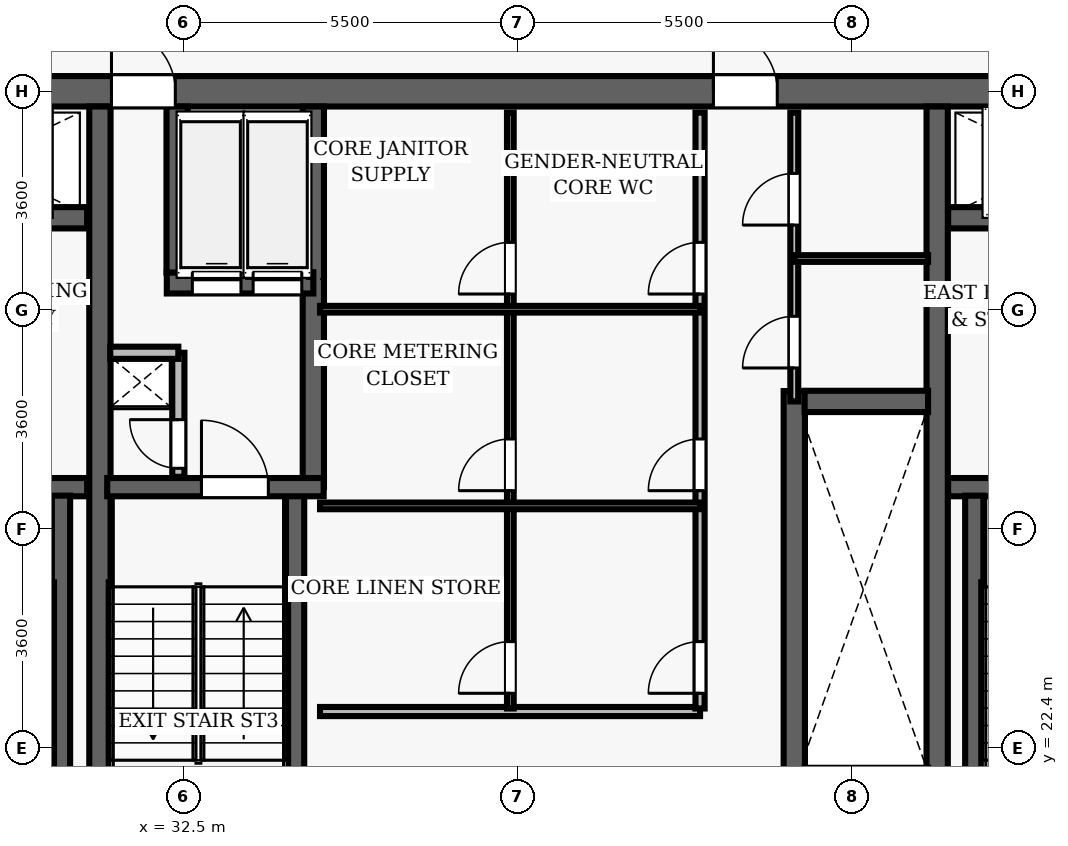
"""IFC4 building model, lengths in metres.
Left out: names, types, materials, properties, quantities, classifications, styles, units other than length and angle.
Written with IfcOpenShell. Run it as: python <this file> out.ifc"""

import sys

from ifc_helpers import new_model, si_unit, direction, frame, frame_2d, origin, place, context, subcontext, project, spatial, rectangle, extrude, element, fill, save


model = new_model("IFC4")
c1 = context("Model", 3, precision=1e-05, world=origin(), true_north=direction((0.0, 1.0)))
c2 = subcontext(c1, "Body", "Model", "MODEL_VIEW")
j1 = project(units=[si_unit("LENGTHUNIT", "METRE"), si_unit("PLANEANGLEUNIT", "RADIAN")], contexts=[c1])
p1 = place(None, origin())
s1 = spatial("IfcSite", under=j1, at=p1, CompositionType="ELEMENT")
p2 = place(p1, origin())
s2 = spatial("IfcBuilding", under=s1, at=p2, CompositionType="ELEMENT")
p3 = place(p2, frame((0.0, 0.0, 198.15)))
s3 = spatial("IfcBuildingStorey", under=s2, at=p3, CompositionType="ELEMENT", Elevation=198.15)
p4 = place(p3, frame((26.75, 33.2, 0.0), z_axis=(0.0, 0.0, 1.0), x_axis=(1.0, 0.0, 0.0)))
e1 = element("IfcWall", 1, at=p4, inside=s3, PredefinedType="SHEAR", context=c2, shape_type="SweptSolid", body=[
    extrude(rectangle(XDim=22.5, YDim=0.5, at=frame_2d((11.25, 0.0))), origin(), (0.0, 0.0, 1.0), 3.85),
])
p5 = place(p4, frame((4.57, 0.0, 0.0)))
e2 = element("IfcOpeningElement", 2, at=p5, cuts=e1, PredefinedType="OPENING", context=c2, shape_type="SweptSolid", body=[
    extrude(rectangle(XDim=1.05, YDim=2.15, at=frame_2d((0.525, 1.075))), frame((0.0, 0.26, 0.0), z_axis=(0.0, -1.0, 0.0), x_axis=(1.0, 0.0, 0.0)), (0.0, 0.0, 1.0), 0.52),
])
p6 = place(p4, frame((14.47, 0.0, 0.0)))
e3 = element("IfcOpeningElement", 3, at=p6, cuts=e1, PredefinedType="OPENING", context=c2, shape_type="SweptSolid", body=[
    extrude(rectangle(XDim=1.05, YDim=2.15, at=frame_2d((0.525, 1.075))), frame((0.0, 0.26, 0.0), z_axis=(0.0, -1.0, 0.0), x_axis=(1.0, 0.0, 0.0)), (0.0, 0.0, 1.0), 0.52),
])
for number, where, z_axis, x_axis in (
    (4, (31.13, 19.05, 0.0), (0.0, 0.0, 1.0), (0.0, 1.0, 0.0)),
    (5, (44.9, 19.05, 0.0), (0.0, 0.0, 1.0), (0.0, 1.0, 0.0)),
):
    element("IfcWall", number, at=place(p3, frame(where, z_axis=z_axis, x_axis=x_axis)), inside=s3, PredefinedType="SHEAR", context=c2, shape_type="SweptSolid", body=[
        extrude(rectangle(XDim=13.9, YDim=0.35, at=frame_2d((6.95, 0.0))), origin(), (0.0, 0.0, 1.0), 3.85),
    ])
p7 = place(p3, frame((27.25, 26.69, 0.0), z_axis=(0.0, 0.0, 1.0), x_axis=(1.0, 0.0, 0.0)))
e6 = element("IfcWall", 6, at=p7, inside=s3, PredefinedType="SHEAR", context=c2, shape_type="SweptSolid", body=[
    extrude(rectangle(XDim=3.67, YDim=0.3, at=frame_2d((1.835, 0.0))), origin(), (0.0, 0.0, 1.0), 3.85),
])
p8 = place(p7, frame((1.05, 0.0, 0.0)))
e7 = element("IfcOpeningElement", 7, at=p8, cuts=e6, PredefinedType="OPENING", context=c2, shape_type="SweptSolid", body=[
    extrude(rectangle(XDim=1.1, YDim=2.15, at=frame_2d((0.55, 1.075))), frame((0.0, 0.16, 0.0), z_axis=(0.0, -1.0, 0.0), x_axis=(1.0, 0.0, 0.0)), (0.0, 0.0, 1.0), 0.32),
])
p9 = place(p3, frame((30.49, 19.05, 0.0), z_axis=(0.0, 0.0, 1.0), x_axis=(0.0, 1.0, 0.0)))
e8 = element("IfcWall", 8, at=p9, inside=s3, PredefinedType="SHEAR", context=c2, shape_type="SweptSolid", body=[
    extrude(rectangle(XDim=7.5, YDim=0.3, at=frame_2d((3.75, 0.0))), origin(), (0.0, 0.0, 1.0), 3.85),
])
p10 = place(p3, frame((27.25, 31.12, 0.0), z_axis=(0.0, 0.0, 1.0), x_axis=(1.0, 0.0, 0.0)))
e9 = element("IfcWall", 9, at=p10, inside=s3, PredefinedType="SHEAR", context=c2, shape_type="SweptSolid", body=[
    extrude(rectangle(XDim=3.67, YDim=0.35, at=frame_2d((1.835, 0.0))), origin(), (0.0, 0.0, 1.0), 3.035),
])
p11 = place(p10, frame((1.25, 0.0, 0.0)))
e10 = element("IfcOpeningElement", 10, at=p11, cuts=e9, PredefinedType="OPENING", context=c2, shape_type="SweptSolid", body=[
    extrude(rectangle(XDim=1.1, YDim=2.15, at=frame_2d((0.55, 1.075))), frame((0.0, 0.185, 0.0), z_axis=(0.0, -1.0, 0.0), x_axis=(1.0, 0.0, 0.0)), (0.0, 0.0, 1.0), 0.37),
])
p12 = place(p3, frame((45.08, 26.69, 0.0), z_axis=(0.0, 0.0, 1.0), x_axis=(1.0, 0.0, 0.0)))
e11 = element("IfcWall", 11, at=p12, inside=s3, PredefinedType="SHEAR", context=c2, shape_type="SweptSolid", body=[
    extrude(rectangle(XDim=3.67, YDim=0.3, at=frame_2d((1.835, 0.0))), origin(), (0.0, 0.0, 1.0), 3.85),
])
p13 = place(p12, frame((1.05, 0.0, 0.0)))
e12 = element("IfcOpeningElement", 12, at=p13, cuts=e11, PredefinedType="OPENING", context=c2, shape_type="SweptSolid", body=[
    extrude(rectangle(XDim=1.1, YDim=2.15, at=frame_2d((0.55, 1.075))), frame((0.0, 0.16, 0.0), z_axis=(0.0, -1.0, 0.0), x_axis=(1.0, 0.0, 0.0)), (0.0, 0.0, 1.0), 0.32),
])
p14 = place(p3, frame((45.51, 19.05, 0.0), z_axis=(0.0, 0.0, 1.0), x_axis=(0.0, 1.0, 0.0)))
e13 = element("IfcWall", 13, at=p14, inside=s3, PredefinedType="SHEAR", context=c2, shape_type="SweptSolid", body=[
    extrude(rectangle(XDim=7.5, YDim=0.3, at=frame_2d((3.75, 0.0))), origin(), (0.0, 0.0, 1.0), 3.85),
])
p15 = place(p3, frame((45.08, 31.12, 0.0), z_axis=(0.0, 0.0, 1.0), x_axis=(1.0, 0.0, 0.0)))
e14 = element("IfcWall", 14, at=p15, inside=s3, PredefinedType="SHEAR", context=c2, shape_type="SweptSolid", body=[
    extrude(rectangle(XDim=3.67, YDim=0.35, at=frame_2d((1.835, 0.0))), origin(), (0.0, 0.0, 1.0), 3.035),
])
p16 = place(p15, frame((1.25, 0.0, 0.0)))
e15 = element("IfcOpeningElement", 15, at=p16, cuts=e14, PredefinedType="OPENING", context=c2, shape_type="SweptSolid", body=[
    extrude(rectangle(XDim=1.1, YDim=2.15, at=frame_2d((0.55, 1.075))), frame((0.0, 0.185, 0.0), z_axis=(0.0, -1.0, 0.0), x_axis=(1.0, 0.0, 0.0)), (0.0, 0.0, 1.0), 0.37),
])
p17 = place(p3, frame((34.34, 19.05, 0.0), z_axis=(0.0, 0.0, 1.0), x_axis=(0.0, 1.0, 0.0)))
e16 = element("IfcWall", 16, at=p17, inside=s3, PredefinedType="SHEAR", context=c2, shape_type="SweptSolid", body=[
    extrude(rectangle(XDim=7.5, YDim=0.3, at=frame_2d((3.75, 0.0))), origin(), (0.0, 0.0, 1.0), 3.85),
])
p18 = place(p3, frame((34.64, 26.69, 0.0), z_axis=(0.0, 0.0, 1.0), x_axis=(0.0, 1.0, 0.0)))
e17 = element("IfcWall", 17, at=p18, inside=s3, PredefinedType="SHEAR", context=c2, shape_type="SweptSolid", body=[
    extrude(rectangle(XDim=6.26, YDim=0.35, at=frame_2d((3.13, 0.0))), origin(), (0.0, 0.0, 1.0), 3.85),
])
p19 = place(p3, frame((31.25, 26.69, 0.0), z_axis=(0.0, 0.0, 1.0), x_axis=(1.0, 0.0, 0.0)))
e18 = element("IfcWall", 18, at=p19, inside=s3, PredefinedType="SHEAR", context=c2, shape_type="SweptSolid", body=[
    extrude(rectangle(XDim=3.56, YDim=0.3, at=frame_2d((1.78, 0.0))), origin(), (0.0, 0.0, 1.0), 3.85),
])
p20 = place(p19, frame((1.55, 0.0, 0.0)))
e19 = element("IfcOpeningElement", 19, at=p20, cuts=e18, PredefinedType="OPENING", context=c2, shape_type="SweptSolid", body=[
    extrude(rectangle(XDim=1.1, YDim=2.15, at=frame_2d((0.55, 1.075))), frame((0.0, 0.16, 0.0), z_axis=(0.0, -1.0, 0.0), x_axis=(1.0, 0.0, 0.0)), (0.0, 0.0, 1.0), 0.32),
])
p21 = place(p3, frame((32.23, 30.05, 0.0), z_axis=(0.0, 0.0, 1.0), x_axis=(1.0, 0.0, 0.0)))
e20 = element("IfcWall", 20, at=p21, inside=s3, PredefinedType="SHEAR", context=c2, shape_type="SweptSolid", body=[
    extrude(rectangle(XDim=2.41, YDim=0.35, at=frame_2d((1.205, 0.0))), origin(), (0.0, 0.0, 1.0), 3.035),
])
p22 = place(p21, frame((0.42, 0.0, 0.0)))
e21 = element("IfcOpeningElement", 21, at=p22, cuts=e20, PredefinedType="OPENING", context=c2, shape_type="SweptSolid", body=[
    extrude(rectangle(XDim=0.8, YDim=2.15, at=frame_2d((0.4, 1.075))), frame((0.0, 0.185, 0.0), z_axis=(0.0, -1.0, 0.0), x_axis=(1.0, 0.0, 0.0)), (0.0, 0.0, 1.0), 0.37),
])
p23 = place(p21, frame((1.42, 0.0, 0.0)))
e22 = element("IfcOpeningElement", 22, at=p23, cuts=e20, PredefinedType="OPENING", context=c2, shape_type="SweptSolid", body=[
    extrude(rectangle(XDim=0.8, YDim=2.15, at=frame_2d((0.4, 1.075))), frame((0.0, 0.185, 0.0), z_axis=(0.0, -1.0, 0.0), x_axis=(1.0, 0.0, 0.0)), (0.0, 0.0, 1.0), 0.37),
])
p24 = place(p3, frame((32.4, 30.22, 0.0), z_axis=(0.0, 0.0, 1.0), x_axis=(0.0, 1.0, 0.0)))
e23 = element("IfcWall", 23, at=p24, inside=s3, PredefinedType="SHEAR", context=c2, shape_type="SweptSolid", body=[
    extrude(rectangle(XDim=2.73, YDim=0.35, at=frame_2d((1.365, 0.0))), origin(), (0.0, 0.0, 1.0), 3.035),
])
p25 = place(p3, frame((32.42, 26.86, 0.0), z_axis=(0.0, 0.0, 1.0), x_axis=(0.0, 1.0, 0.0)))
e24 = element("IfcWall", 24, at=p25, inside=s3, PredefinedType="PARTITIONING", context=c2, shape_type="SweptSolid", body=[
    extrude(rectangle(XDim=2.04, YDim=0.2, at=frame_2d((1.02, 0.0))), origin(), (0.0, 0.0, 1.0), 3.035),
])
p26 = place(p25, frame((0.14, 0.0, 0.0)))
e25 = element("IfcOpeningElement", 25, at=p26, cuts=e24, PredefinedType="OPENING", context=c2, shape_type="SweptSolid", body=[
    extrude(rectangle(XDim=0.8, YDim=2.05, at=frame_2d((0.4, 1.025))), frame((0.0, 0.11, 0.0), z_axis=(0.0, -1.0, 0.0), x_axis=(1.0, 0.0, 0.0)), (0.0, 0.0, 1.0), 0.22),
])
p27 = place(p3, frame((31.3, 28.9, 0.0), z_axis=(0.0, 0.0, 1.0), x_axis=(1.0, 0.0, 0.0)))
e26 = element("IfcWall", 26, at=p27, inside=s3, PredefinedType="PARTITIONING", context=c2, shape_type="SweptSolid", body=[
    extrude(rectangle(XDim=1.12, YDim=0.2, at=frame_2d((0.56, 0.0))), origin(), (0.0, 0.0, 1.0), 3.035),
])
p28 = place(p3, frame((42.55, 21.73, 0.0), z_axis=(0.0, 0.0, 1.0), x_axis=(0.0, 1.0, 0.0)))
e27 = element("IfcWall", 27, at=p28, inside=s3, PredefinedType="SHEAR", context=c2, shape_type="SweptSolid", body=[
    extrude(rectangle(XDim=6.54, YDim=0.35, at=frame_2d((3.27, 0.0))), origin(), (0.0, 0.0, 1.0), 3.035),
])
p29 = place(p3, frame((42.72, 28.1, 0.0), z_axis=(0.0, 0.0, 1.0), x_axis=(1.0, 0.0, 0.0)))
e28 = element("IfcWall", 28, at=p29, inside=s3, PredefinedType="SHEAR", context=c2, shape_type="SweptSolid", body=[
    extrude(rectangle(XDim=2.03, YDim=0.35, at=frame_2d((1.015, 0.0))), origin(), (0.0, 0.0, 1.0), 3.035),
])
p30 = place(p3, frame((34.75, 23.0, 0.0), z_axis=(0.0, 0.0, 1.0), x_axis=(1.0, 0.0, 0.0)))
e29 = element("IfcWall", 29, at=p30, inside=s3, PredefinedType="PARTITIONING", context=c2, shape_type="SweptSolid", body=[
    extrude(rectangle(XDim=6.25, YDim=0.15, at=frame_2d((3.125, 0.0))), origin(), (0.0, 0.0, 1.0), 3.035),
])
p31 = place(p3, frame((41.0, 23.05, 0.0), z_axis=(0.0, 0.0, 1.0), x_axis=(0.0, 1.0, 0.0)))
e30 = element("IfcWall", 30, at=p31, inside=s3, PredefinedType="PARTITIONING", context=c2, shape_type="SweptSolid", body=[
    extrude(rectangle(XDim=9.8, YDim=0.15, at=frame_2d((4.9, 0.0))), origin(), (0.0, 0.0, 1.0), 3.035),
])
p32 = place(p31, frame((0.25, 0.0, 0.0)))
e31 = element("IfcOpeningElement", 31, at=p32, cuts=e30, PredefinedType="OPENING", context=c2, shape_type="SweptSolid", body=[
    extrude(rectangle(XDim=0.85, YDim=2.1, at=frame_2d((0.425, 1.05))), frame((0.0, 0.085, 0.0), z_axis=(0.0, -1.0, 0.0), x_axis=(1.0, 0.0, 0.0)), (0.0, 0.0, 1.0), 0.17),
])
p33 = place(p31, frame((3.582, 0.0, 0.0)))
e32 = element("IfcOpeningElement", 32, at=p33, cuts=e30, PredefinedType="OPENING", context=c2, shape_type="SweptSolid", body=[
    extrude(rectangle(XDim=0.85, YDim=2.1, at=frame_2d((0.425, 1.05))), frame((0.0, 0.085, 0.0), z_axis=(0.0, -1.0, 0.0), x_axis=(1.0, 0.0, 0.0)), (0.0, 0.0, 1.0), 0.17),
])
p34 = place(p31, frame((6.816, 0.0, 0.0)))
e33 = element("IfcOpeningElement", 33, at=p34, cuts=e30, PredefinedType="OPENING", context=c2, shape_type="SweptSolid", body=[
    extrude(rectangle(XDim=0.85, YDim=2.1, at=frame_2d((0.425, 1.05))), frame((0.0, 0.085, 0.0), z_axis=(0.0, -1.0, 0.0), x_axis=(1.0, 0.0, 0.0)), (0.0, 0.0, 1.0), 0.17),
])
p35 = place(p3, frame((37.88, 23.05, 0.0), z_axis=(0.0, 0.0, 1.0), x_axis=(0.0, 1.0, 0.0)))
e34 = element("IfcWall", 34, at=p35, inside=s3, PredefinedType="PARTITIONING", context=c2, shape_type="SweptSolid", body=[
    extrude(rectangle(XDim=9.8, YDim=0.11, at=frame_2d((4.9, 0.0))), origin(), (0.0, 0.0, 1.0), 3.035),
])
p36 = place(p35, frame((0.25, 0.0, 0.0)))
e35 = element("IfcOpeningElement", 35, at=p36, cuts=e34, PredefinedType="OPENING", context=c2, shape_type="SweptSolid", body=[
    extrude(rectangle(XDim=0.85, YDim=2.1, at=frame_2d((0.425, 1.05))), frame((0.0, 0.065, 0.0), z_axis=(0.0, -1.0, 0.0), x_axis=(1.0, 0.0, 0.0)), (0.0, 0.0, 1.0), 0.13),
])
p37 = place(p35, frame((3.582, 0.0, 0.0)))
e36 = element("IfcOpeningElement", 36, at=p37, cuts=e34, PredefinedType="OPENING", context=c2, shape_type="SweptSolid", body=[
    extrude(rectangle(XDim=0.85, YDim=2.1, at=frame_2d((0.425, 1.05))), frame((0.0, 0.065, 0.0), z_axis=(0.0, -1.0, 0.0), x_axis=(1.0, 0.0, 0.0)), (0.0, 0.0, 1.0), 0.13),
])
p38 = place(p35, frame((6.816, 0.0, 0.0)))
e37 = element("IfcOpeningElement", 37, at=p38, cuts=e34, PredefinedType="OPENING", context=c2, shape_type="SweptSolid", body=[
    extrude(rectangle(XDim=0.85, YDim=2.1, at=frame_2d((0.425, 1.05))), frame((0.0, 0.065, 0.0), z_axis=(0.0, -1.0, 0.0), x_axis=(1.0, 0.0, 0.0)), (0.0, 0.0, 1.0), 0.13),
])
for number, where, z_axis, x_axis in (
    (38, (34.75, 26.382, 0.0), (0.0, 0.0, 1.0), (1.0, 0.0, 0.0)),
    (39, (34.75, 29.616, 0.0), (0.0, 0.0, 1.0), (1.0, 0.0, 0.0)),
):
    element("IfcWall", number, at=place(p3, frame(where, z_axis=z_axis, x_axis=x_axis)), inside=s3, PredefinedType="PARTITIONING", context=c2, shape_type="SweptSolid", body=[
        extrude(rectangle(XDim=6.25, YDim=0.11, at=frame_2d((3.125, 0.0))), origin(), (0.0, 0.0, 1.0), 3.035),
    ])
p39 = place(p3, frame((42.55, 28.1, 0.0), z_axis=(0.0, 0.0, 1.0), x_axis=(0.0, 1.0, 0.0)))
e40 = element("IfcWall", 40, at=p39, inside=s3, PredefinedType="PARTITIONING", context=c2, shape_type="SweptSolid", body=[
    extrude(rectangle(XDim=4.75, YDim=0.13, at=frame_2d((2.375, 0.0))), origin(), (0.0, 0.0, 1.0), 3.035),
])
p40 = place(p39, frame((0.55, 0.0, 0.0)))
e41 = element("IfcOpeningElement", 41, at=p40, cuts=e40, PredefinedType="OPENING", context=c2, shape_type="SweptSolid", body=[
    extrude(rectangle(XDim=0.85, YDim=2.1, at=frame_2d((0.425, 1.05))), frame((0.0, 0.075, 0.0), z_axis=(0.0, -1.0, 0.0), x_axis=(1.0, 0.0, 0.0)), (0.0, 0.0, 1.0), 0.15),
])
p41 = place(p39, frame((2.9, 0.0, 0.0)))
e42 = element("IfcOpeningElement", 42, at=p41, cuts=e40, PredefinedType="OPENING", context=c2, shape_type="SweptSolid", body=[
    extrude(rectangle(XDim=0.85, YDim=2.1, at=frame_2d((0.425, 1.05))), frame((0.0, 0.075, 0.0), z_axis=(0.0, -1.0, 0.0), x_axis=(1.0, 0.0, 0.0)), (0.0, 0.0, 1.0), 0.15),
])
p42 = place(p3, frame((42.55, 30.45, 0.0), z_axis=(0.0, 0.0, 1.0), x_axis=(1.0, 0.0, 0.0)))
e43 = element("IfcWall", 43, at=p42, inside=s3, PredefinedType="PARTITIONING", context=c2, shape_type="SweptSolid", body=[
    extrude(rectangle(XDim=2.2, YDim=0.11, at=frame_2d((1.1, 0.0))), origin(), (0.0, 0.0, 1.0), 3.035),
])
p43 = place(p20, origin())
e44 = element("IfcDoor", 44, at=p43, inside=s3, OperationType="SINGLE_SWING_LEFT", PredefinedType="DOOR", context=c2, shape_type="SweptSolid", body=[
    extrude(rectangle(XDim=1.1, YDim=2.15, at=frame_2d((0.55, 1.075))), frame((0.0, 0.025, 0.0), z_axis=(0.0, -1.0, 0.0), x_axis=(1.0, 0.0, 0.0)), (0.0, 0.0, 1.0), 0.05),
])
fill(e19, e44)
p44 = place(p26, origin())
e45 = element("IfcDoor", 45, at=p44, inside=s3, OperationType="SINGLE_SWING_RIGHT", PredefinedType="DOOR", context=c2, shape_type="SweptSolid", body=[
    extrude(rectangle(XDim=0.8, YDim=2.05, at=frame_2d((0.4, 1.025))), frame((0.0, 0.025, 0.0), z_axis=(0.0, -1.0, 0.0), x_axis=(1.0, 0.0, 0.0)), (0.0, 0.0, 1.0), 0.05),
])
fill(e25, e45)
p45 = place(p5, origin())
e46 = element("IfcDoor", 46, at=p45, inside=s3, OperationType="SINGLE_SWING_LEFT", PredefinedType="DOOR", context=c2, shape_type="SweptSolid", body=[
    extrude(rectangle(XDim=1.05, YDim=2.15, at=frame_2d((0.525, 1.075))), frame((0.0, 0.025, 0.0), z_axis=(0.0, -1.0, 0.0), x_axis=(1.0, 0.0, 0.0)), (0.0, 0.0, 1.0), 0.05),
])
fill(e2, e46)
p46 = place(p6, origin())
e47 = element("IfcDoor", 47, at=p46, inside=s3, OperationType="SINGLE_SWING_LEFT", PredefinedType="DOOR", context=c2, shape_type="SweptSolid", body=[
    extrude(rectangle(XDim=1.05, YDim=2.15, at=frame_2d((0.525, 1.075))), frame((0.0, 0.025, 0.0), z_axis=(0.0, -1.0, 0.0), x_axis=(1.0, 0.0, 0.0)), (0.0, 0.0, 1.0), 0.05),
])
fill(e3, e47)
p47 = place(p32, origin())
e48 = element("IfcDoor", 48, at=p47, inside=s3, OperationType="SINGLE_SWING_LEFT", PredefinedType="DOOR", context=c2, shape_type="SweptSolid", body=[
    extrude(rectangle(XDim=0.85, YDim=2.1, at=frame_2d((0.425, 1.05))), frame((0.0, 0.025, 0.0), z_axis=(0.0, -1.0, 0.0), x_axis=(1.0, 0.0, 0.0)), (0.0, 0.0, 1.0), 0.05),
])
fill(e31, e48)
p48 = place(p36, origin())
e49 = element("IfcDoor", 49, at=p48, inside=s3, OperationType="SINGLE_SWING_LEFT", PredefinedType="DOOR", context=c2, shape_type="SweptSolid", body=[
    extrude(rectangle(XDim=0.85, YDim=2.1, at=frame_2d((0.425, 1.05))), frame((0.0, 0.025, 0.0), z_axis=(0.0, -1.0, 0.0), x_axis=(1.0, 0.0, 0.0)), (0.0, 0.0, 1.0), 0.05),
])
fill(e35, e49)
p49 = place(p33, origin())
e50 = element("IfcDoor", 50, at=p49, inside=s3, OperationType="SINGLE_SWING_LEFT", PredefinedType="DOOR", context=c2, shape_type="SweptSolid", body=[
    extrude(rectangle(XDim=0.85, YDim=2.1, at=frame_2d((0.425, 1.05))), frame((0.0, 0.025, 0.0), z_axis=(0.0, -1.0, 0.0), x_axis=(1.0, 0.0, 0.0)), (0.0, 0.0, 1.0), 0.05),
])
fill(e32, e50)
p50 = place(p37, origin())
e51 = element("IfcDoor", 51, at=p50, inside=s3, OperationType="SINGLE_SWING_LEFT", PredefinedType="DOOR", context=c2, shape_type="SweptSolid", body=[
    extrude(rectangle(XDim=0.85, YDim=2.1, at=frame_2d((0.425, 1.05))), frame((0.0, 0.025, 0.0), z_axis=(0.0, -1.0, 0.0), x_axis=(1.0, 0.0, 0.0)), (0.0, 0.0, 1.0), 0.05),
])
fill(e36, e51)
p51 = place(p34, origin())
e52 = element("IfcDoor", 52, at=p51, inside=s3, OperationType="SINGLE_SWING_LEFT", PredefinedType="DOOR", context=c2, shape_type="SweptSolid", body=[
    extrude(rectangle(XDim=0.85, YDim=2.1, at=frame_2d((0.425, 1.05))), frame((0.0, 0.025, 0.0), z_axis=(0.0, -1.0, 0.0), x_axis=(1.0, 0.0, 0.0)), (0.0, 0.0, 1.0), 0.05),
])
fill(e33, e52)
p52 = place(p38, origin())
e53 = element("IfcDoor", 53, at=p52, inside=s3, OperationType="SINGLE_SWING_LEFT", PredefinedType="DOOR", context=c2, shape_type="SweptSolid", body=[
    extrude(rectangle(XDim=0.85, YDim=2.1, at=frame_2d((0.425, 1.05))), frame((0.0, 0.025, 0.0), z_axis=(0.0, -1.0, 0.0), x_axis=(1.0, 0.0, 0.0)), (0.0, 0.0, 1.0), 0.05),
])
fill(e37, e53)
p53 = place(p40, origin())
e54 = element("IfcDoor", 54, at=p53, inside=s3, OperationType="SINGLE_SWING_LEFT", PredefinedType="DOOR", context=c2, shape_type="SweptSolid", body=[
    extrude(rectangle(XDim=0.85, YDim=2.1, at=frame_2d((0.425, 1.05))), frame((0.0, 0.025, 0.0), z_axis=(0.0, -1.0, 0.0), x_axis=(1.0, 0.0, 0.0)), (0.0, 0.0, 1.0), 0.05),
])
fill(e41, e54)
p54 = place(p41, origin())
e55 = element("IfcDoor", 55, at=p54, inside=s3, OperationType="SINGLE_SWING_LEFT", PredefinedType="DOOR", context=c2, shape_type="SweptSolid", body=[
    extrude(rectangle(XDim=0.85, YDim=2.1, at=frame_2d((0.425, 1.05))), frame((0.0, 0.025, 0.0), z_axis=(0.0, -1.0, 0.0), x_axis=(1.0, 0.0, 0.0)), (0.0, 0.0, 1.0), 0.05),
])
fill(e42, e55)
p55 = place(p22, origin())
e56 = element("IfcDoor", 56, at=p55, inside=s3, OperationType="SLIDING_TO_LEFT", PredefinedType="DOOR", context=c2, shape_type="SweptSolid", body=[
    extrude(rectangle(XDim=0.8, YDim=2.15, at=frame_2d((0.4, 1.075))), frame((0.0, 0.025, 0.0), z_axis=(0.0, -1.0, 0.0), x_axis=(1.0, 0.0, 0.0)), (0.0, 0.0, 1.0), 0.05),
])
fill(e21, e56)
p56 = place(p23, origin())
e57 = element("IfcDoor", 57, at=p56, inside=s3, OperationType="SLIDING_TO_LEFT", PredefinedType="DOOR", context=c2, shape_type="SweptSolid", body=[
    extrude(rectangle(XDim=0.8, YDim=2.15, at=frame_2d((0.4, 1.075))), frame((0.0, 0.025, 0.0), z_axis=(0.0, -1.0, 0.0), x_axis=(1.0, 0.0, 0.0)), (0.0, 0.0, 1.0), 0.05),
])
fill(e22, e57)
save(model, sys.argv[1])
